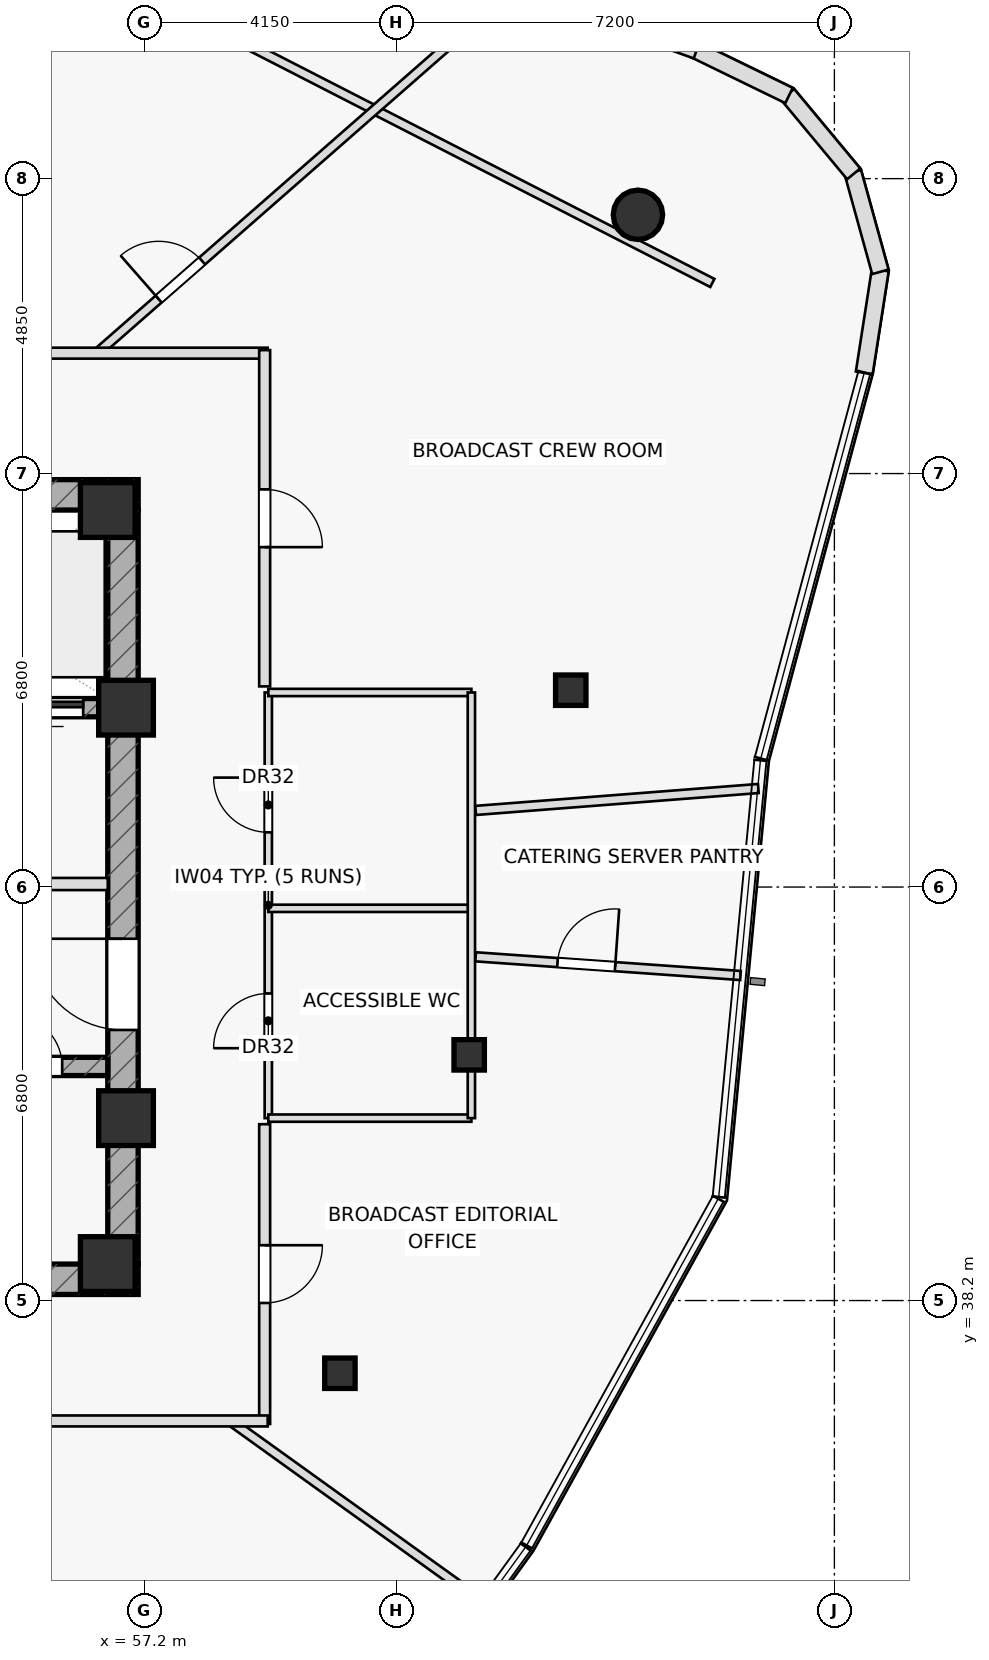
"""IFC4 building model, lengths in metres.
Left out: names, types, materials, properties, quantities, classifications, styles, units other than length and angle.
Written with IfcOpenShell. Run it as: python <this file> out.ifc"""

import sys

from ifc_helpers import new_model, si_unit, direction, frame, frame_2d, origin, origin_2d, place, context, subcontext, project, spatial, rectangle, hollow_rectangle, hollow_circle, extrude, element, fill, save


model = new_model("IFC4")
c1 = context("Model", 3, precision=1e-05, world=origin(), true_north=direction((0.0, 1.0)))
c2 = subcontext(c1, "Body", "Model", "MODEL_VIEW")
j1 = project(units=[si_unit("LENGTHUNIT", "METRE"), si_unit("PLANEANGLEUNIT", "RADIAN")], contexts=[c1])
p1 = place(None, origin())
s1 = spatial("IfcSite", under=j1, at=p1, CompositionType="ELEMENT")
p2 = place(p1, origin())
s2 = spatial("IfcBuilding", under=s1, at=p2, CompositionType="ELEMENT")
p3 = place(p2, frame((0.0, 0.0, 285.5)))
s3 = spatial("IfcBuildingStorey", under=s2, at=p3, CompositionType="ELEMENT", Elevation=285.5)
p4 = place(p3, frame((42.9, 51.45, 0.0), z_axis=(0.0, 0.0, 1.0), x_axis=(1.0, 0.0, 0.0)))
e1 = element("IfcWall", 1, at=p4, inside=s3, PredefinedType="SHEAR", context=c2, shape_type="SweptSolid", body=[
    extrude(rectangle(XDim=14.2, YDim=0.5, at=frame_2d((7.1, 0.0))), origin(), (0.0, 0.0, 1.0), 3.7),
])
p5 = place(p4, frame((0.78, 0.0, 0.0)))
e2 = element("IfcOpeningElement", 2, at=p5, cuts=e1, PredefinedType="OPENING", context=c2, shape_type="SweptSolid", body=[
    extrude(rectangle(XDim=1.05, YDim=2.2, at=frame_2d((0.525, 1.1))), frame((0.0, 0.26, 0.0), z_axis=(0.0, -1.0, 0.0), x_axis=(1.0, 0.0, 0.0)), (0.0, 0.0, 1.0), 0.52),
])
p6 = place(p3, frame((42.9, 38.55, 0.0), z_axis=(0.0, 0.0, 1.0), x_axis=(1.0, 0.0, 0.0)))
e3 = element("IfcWall", 3, at=p6, inside=s3, PredefinedType="SHEAR", context=c2, shape_type="SweptSolid", body=[
    extrude(rectangle(XDim=14.2, YDim=0.5, at=frame_2d((7.1, 0.0))), origin(), (0.0, 0.0, 1.0), 3.7),
])
p7 = place(p6, frame((0.78, 0.0, 0.0)))
e4 = element("IfcOpeningElement", 4, at=p7, cuts=e3, PredefinedType="OPENING", context=c2, shape_type="SweptSolid", body=[
    extrude(rectangle(XDim=1.05, YDim=2.2, at=frame_2d((0.525, 1.1))), frame((0.0, 0.26, 0.0), z_axis=(0.0, -1.0, 0.0), x_axis=(1.0, 0.0, 0.0)), (0.0, 0.0, 1.0), 0.52),
])
p8 = place(p3, frame((56.85, 38.8, 0.0), z_axis=(0.0, 0.0, 1.0), x_axis=(0.0, 1.0, 0.0)))
e5 = element("IfcWall", 5, at=p8, inside=s3, PredefinedType="SHEAR", context=c2, shape_type="SweptSolid", body=[
    extrude(rectangle(XDim=12.4, YDim=0.5, at=frame_2d((6.2, 0.0))), origin(), (0.0, 0.0, 1.0), 3.7),
])
p9 = place(p8, frame((3.85, 0.0, 0.0)))
e6 = element("IfcOpeningElement", 6, at=p9, cuts=e5, PredefinedType="OPENING", context=c2, shape_type="SweptSolid", body=[
    extrude(rectangle(XDim=1.5, YDim=2.2, at=frame_2d((0.75, 1.1))), frame((0.0, 0.26, 0.0), z_axis=(0.0, -1.0, 0.0), x_axis=(1.0, 0.0, 0.0)), (0.0, 0.0, 1.0), 0.52),
])
p10 = place(p3, frame((43.4, 47.95, 0.0), z_axis=(0.0, 0.0, 1.0), x_axis=(1.0, 0.0, 0.0)))
e7 = element("IfcWall", 7, at=p10, inside=s3, PredefinedType="SHEAR", context=c2, shape_type="SweptSolid", body=[
    extrude(rectangle(XDim=13.2, YDim=0.3, at=frame_2d((6.6, 0.0))), origin(), (0.0, 0.0, 1.0), 3.7),
])
p11 = place(p10, frame((8.345, 0.0, 0.0)))
e8 = element("IfcOpeningElement", 8, at=p11, cuts=e7, PredefinedType="OPENING", context=c2, shape_type="SweptSolid", body=[
    extrude(rectangle(XDim=1.15, YDim=2.2, at=frame_2d((0.575, 1.1))), frame((0.0, 0.16, 0.0), z_axis=(0.0, -1.0, 0.0), x_axis=(1.0, 0.0, 0.0)), (0.0, 0.0, 1.0), 0.32),
])
p12 = place(p10, frame((10.065, 0.0, 0.0)))
e9 = element("IfcOpeningElement", 9, at=p12, cuts=e7, PredefinedType="OPENING", context=c2, shape_type="SweptSolid", body=[
    extrude(rectangle(XDim=1.15, YDim=2.2, at=frame_2d((0.575, 1.1))), frame((0.0, 0.16, 0.0), z_axis=(0.0, -1.0, 0.0), x_axis=(1.0, 0.0, 0.0)), (0.0, 0.0, 1.0), 0.32),
])
p13 = place(p10, frame((11.645, 0.0, 0.0)))
e10 = element("IfcOpeningElement", 10, at=p13, cuts=e7, PredefinedType="OPENING", context=c2, shape_type="SweptSolid", body=[
    extrude(rectangle(XDim=1.15, YDim=2.2, at=frame_2d((0.575, 1.1))), frame((0.0, 0.16, 0.0), z_axis=(0.0, -1.0, 0.0), x_axis=(1.0, 0.0, 0.0)), (0.0, 0.0, 1.0), 0.32),
])
p14 = place(p3, frame((43.4, 42.05, 0.0), z_axis=(0.0, 0.0, 1.0), x_axis=(1.0, 0.0, 0.0)))
e11 = element("IfcWall", 11, at=p14, inside=s3, PredefinedType="SHEAR", context=c2, shape_type="SweptSolid", body=[
    extrude(rectangle(XDim=13.2, YDim=0.3, at=frame_2d((6.6, 0.0))), origin(), (0.0, 0.0, 1.0), 3.7),
])
p15 = place(p14, frame((7.45, 0.0, 0.0)))
e12 = element("IfcOpeningElement", 12, at=p15, cuts=e11, PredefinedType="OPENING", context=c2, shape_type="SweptSolid", body=[
    extrude(rectangle(XDim=0.85, YDim=2.05, at=frame_2d((0.425, 1.025))), frame((0.0, 0.16, 0.0), z_axis=(0.0, -1.0, 0.0), x_axis=(1.0, 0.0, 0.0)), (0.0, 0.0, 1.0), 0.32),
])
p16 = place(p14, frame((9.5, 0.0, 0.0)))
e13 = element("IfcOpeningElement", 13, at=p16, cuts=e11, PredefinedType="OPENING", context=c2, shape_type="SweptSolid", body=[
    extrude(rectangle(XDim=0.85, YDim=2.05, at=frame_2d((0.425, 1.025))), frame((0.0, 0.16, 0.0), z_axis=(0.0, -1.0, 0.0), x_axis=(1.0, 0.0, 0.0)), (0.0, 0.0, 1.0), 0.32),
])
p17 = place(p14, frame((11.6, 0.0, 0.0)))
e14 = element("IfcOpeningElement", 14, at=p17, cuts=e11, PredefinedType="OPENING", context=c2, shape_type="SweptSolid", body=[
    extrude(rectangle(XDim=0.85, YDim=2.05, at=frame_2d((0.425, 1.025))), frame((0.0, 0.16, 0.0), z_axis=(0.0, -1.0, 0.0), x_axis=(1.0, 0.0, 0.0)), (0.0, 0.0, 1.0), 0.32),
])
for number, where, z_axis, x_axis in (
    (15, (56.9, 47.95, 0.0), (0.0, 0.0, 1.0), (1.0, 0.0, 0.0)),
    (16, (56.6, 51.2, 0.0), (0.0, 0.0, 1.0), (1.0, 0.0, 0.0)),
    (17, (56.9, 41.2, 0.0), (0.0, 0.0, 1.0), (1.0, 0.0, 0.0)),
    (18, (56.6, 38.8, 0.0), (0.0, 0.0, 1.0), (1.0, 0.0, 0.0)),
):
    element("IfcColumn", number, at=place(p3, frame(where, z_axis=z_axis, x_axis=x_axis)), inside=s3, PredefinedType="COLUMN", context=c2, shape_type="SweptSolid", body=[
        extrude(rectangle(XDim=0.9, YDim=0.9, at=origin_2d()), origin(), (0.0, 0.0, 1.0), 3.7),
    ])
for number, where, z_axis, x_axis in (
    (19, (60.417, 37.004, 0.0), (0.0, 0.0, 1.0), (1.0, 0.0, 0.0)),
    (20, (62.544, 42.24, 0.0), (0.0, 0.0, 1.0), (1.0, 0.0, 0.0)),
    (21, (64.214, 48.237, 0.0), (0.0, 0.0, 1.0), (1.0, 0.0, 0.0)),
):
    element("IfcColumn", number, at=place(p3, frame(where, z_axis=z_axis, x_axis=x_axis)), inside=s3, PredefinedType="COLUMN", context=c2, shape_type="SweptSolid", body=[
        extrude(hollow_rectangle(XDim=0.5, YDim=0.5, WallThickness=0.03, at=origin_2d()), origin(), (0.0, 0.0, 1.0), 3.7),
    ])
p18 = place(p3, frame((65.32, 56.056, 0.0), z_axis=(0.0, 0.0, 1.0), x_axis=(1.0, 0.0, 0.0)))
e22 = element("IfcColumn", 22, at=p18, inside=s3, PredefinedType="COLUMN", context=c2, shape_type="SweptSolid", body=[
    extrude(hollow_circle(Radius=0.406, WallThickness=0.036, at=origin_2d()), origin(), (0.0, 0.0, 1.0), 3.7),
])
p19 = place(p3, frame((50.65, 45.05, 0.0), z_axis=(0.0, 0.0, 1.0), x_axis=(1.0, 0.0, 0.0)))
e23 = element("IfcWall", 23, at=p19, inside=s3, PredefinedType="PARTITIONING", context=c2, shape_type="SweptSolid", body=[
    extrude(rectangle(XDim=5.95, YDim=0.2, at=frame_2d((2.975, 0.0))), origin(), (0.0, 0.0, 1.0), 3.7),
])
p20 = place(p19, frame((1.35, 0.0, 0.0)))
e24 = element("IfcOpeningElement", 24, at=p20, cuts=e23, PredefinedType="OPENING", context=c2, shape_type="SweptSolid", body=[
    extrude(rectangle(XDim=1.5, YDim=2.2, at=frame_2d((0.75, 1.1))), frame((0.0, 0.11, 0.0), z_axis=(0.0, -1.0, 0.0), x_axis=(1.0, 0.0, 0.0)), (0.0, 0.0, 1.0), 0.22),
])
p21 = place(p3, frame((66.543, 54.934, 0.0), z_axis=(0.0, 0.0, 1.0), x_axis=(-0.889966951661, 0.456025026673, 0.0)))
e25 = element("IfcWall", 25, at=p21, inside=s3, PredefinedType="PARTITIONING", context=c2, shape_type="SweptSolid", body=[
    extrude(rectangle(XDim=10.879, YDim=0.15, at=frame_2d((5.439, 0.0))), origin(), (0.0, 0.0, 1.0), 3.235),
])
p22 = place(p3, frame((59.24, 41.2, 0.0), z_axis=(0.0, 0.0, 1.0), x_axis=(0.0, 1.0, 0.0)))
e26 = element("IfcWall", 26, at=p22, inside=s3, PredefinedType="PARTITIONING", context=c2, shape_type="SweptSolid", body=[
    extrude(rectangle(XDim=7.0, YDim=0.12, at=frame_2d((3.5, 0.0))), origin(), (0.0, 0.0, 1.0), 3.7),
])
p23 = place(p22, frame((1.15, 0.0, 0.0)))
e27 = element("IfcOpeningElement", 27, at=p23, cuts=e26, PredefinedType="OPENING", context=c2, shape_type="SweptSolid", body=[
    extrude(rectangle(XDim=0.9, YDim=2.05, at=frame_2d((0.45, 1.025))), frame((0.0, 0.07, 0.0), z_axis=(0.0, -1.0, 0.0), x_axis=(1.0, 0.0, 0.0)), (0.0, 0.0, 1.0), 0.14),
])
p24 = place(p22, frame((4.7, 0.0, 0.0)))
e28 = element("IfcOpeningElement", 28, at=p24, cuts=e26, PredefinedType="OPENING", context=c2, shape_type="SweptSolid", body=[
    extrude(rectangle(XDim=0.9, YDim=2.05, at=frame_2d((0.45, 1.025))), frame((0.0, 0.07, 0.0), z_axis=(0.0, -1.0, 0.0), x_axis=(1.0, 0.0, 0.0)), (0.0, 0.0, 1.0), 0.14),
])
p25 = place(p3, frame((59.24, 41.2, 0.0), z_axis=(0.0, 0.0, 1.0), x_axis=(1.0, 0.0, 0.0)))
e29 = element("IfcWall", 29, at=p25, inside=s3, PredefinedType="PARTITIONING", context=c2, shape_type="SweptSolid", body=[
    extrude(rectangle(XDim=3.34, YDim=0.12, at=frame_2d((1.67, 0.0))), origin(), (0.0, 0.0, 1.0), 3.175),
])
for number, where, z_axis, x_axis in (
    (30, (59.24, 44.65, 0.0), (0.0, 0.0, 1.0), (1.0, 0.0, 0.0)),
    (31, (59.24, 48.2, 0.0), (0.0, 0.0, 1.0), (1.0, 0.0, 0.0)),
):
    element("IfcWall", number, at=place(p3, frame(where, z_axis=z_axis, x_axis=x_axis)), inside=s3, PredefinedType="PARTITIONING", context=c2, shape_type="SweptSolid", body=[
        extrude(rectangle(XDim=3.34, YDim=0.12, at=frame_2d((1.67, 0.0))), origin(), (0.0, 0.0, 1.0), 3.7),
    ])
p26 = place(p3, frame((62.58, 41.2, 0.0), z_axis=(0.0, 0.0, 1.0), x_axis=(0.0, 1.0, 0.0)))
e32 = element("IfcWall", 32, at=p26, inside=s3, PredefinedType="PARTITIONING", context=c2, shape_type="SweptSolid", body=[
    extrude(rectangle(XDim=7.0, YDim=0.12, at=frame_2d((3.5, 0.0))), origin(), (0.0, 0.0, 1.0), 3.235),
])
p27 = place(p3, frame((58.615, 36.22, 0.0), z_axis=(0.0, 0.0, 1.0), x_axis=(0.812006963526, -0.583647745806, 0.0)))
e33 = element("IfcWall", 33, at=p27, inside=s3, PredefinedType="PARTITIONING", context=c2, shape_type="SweptSolid", body=[
    extrude(rectangle(XDim=5.161, YDim=0.15, at=frame_2d((2.58, 0.0))), origin(), (0.0, 0.0, 1.0), 3.235),
])
p28 = place(p3, frame((62.65, 43.853, 0.0), z_axis=(0.0, 0.0, 1.0), x_axis=(0.997519631331, -0.070388813801, 0.0)))
e34 = element("IfcWall", 34, at=p28, inside=s3, PredefinedType="PARTITIONING", context=c2, shape_type="SweptSolid", body=[
    extrude(rectangle(XDim=4.367, YDim=0.15, at=frame_2d((2.183, 0.0))), origin(), (0.0, 0.0, 1.0), 3.235),
])
p29 = place(p28, frame((1.35, 0.0, 0.0)))
e35 = element("IfcOpeningElement", 35, at=p29, cuts=e34, PredefinedType="OPENING", context=c2, shape_type="SweptSolid", body=[
    extrude(rectangle(XDim=0.95, YDim=2.05, at=frame_2d((0.475, 1.025))), frame((0.0, 0.085, 0.0), z_axis=(0.0, -1.0, 0.0), x_axis=(1.0, 0.0, 0.0)), (0.0, 0.0, 1.0), 0.17),
])
p30 = place(p3, frame((62.65, 46.26, 0.0), z_axis=(0.0, 0.0, 1.0), x_axis=(0.997005938074, 0.077325024708, 0.0)))
e36 = element("IfcWall", 36, at=p30, inside=s3, PredefinedType="PARTITIONING", context=c2, shape_type="SweptSolid", body=[
    extrude(rectangle(XDim=4.663, YDim=0.15, at=frame_2d((2.332, 0.0))), origin(), (0.0, 0.0, 1.0), 3.235),
])
p31 = place(p3, frame((56.422, 53.78, 0.0), z_axis=(0.0, 0.0, 1.0), x_axis=(0.752182981844, 0.658954294184, 0.0)))
e37 = element("IfcWall", 37, at=p31, inside=s3, PredefinedType="PARTITIONING", context=c2, shape_type="SweptSolid", body=[
    extrude(rectangle(XDim=9.184, YDim=0.15, at=frame_2d((4.592, 0.0))), origin(), (0.0, 0.0, 1.0), 3.175),
])
p32 = place(p31, frame((1.35, 0.0, 0.0)))
e38 = element("IfcOpeningElement", 38, at=p32, cuts=e37, PredefinedType="OPENING", context=c2, shape_type="SweptSolid", body=[
    extrude(rectangle(XDim=0.95, YDim=2.05, at=frame_2d((0.475, 1.025))), frame((0.0, 0.085, 0.0), z_axis=(0.0, -1.0, 0.0), x_axis=(1.0, 0.0, 0.0)), (0.0, 0.0, 1.0), 0.17),
])
p33 = place(p3, frame((54.3, 53.78, 0.0), z_axis=(0.0, 0.0, 1.0), x_axis=(1.0, 0.0, 0.0)))
e39 = element("IfcWall", 39, at=p33, inside=s3, PredefinedType="PARTITIONING", context=c2, shape_type="SweptSolid", body=[
    extrude(rectangle(XDim=4.93, YDim=0.18, at=frame_2d((2.465, 0.0))), origin(), (0.0, 0.0, 1.0), 3.7),
])
p34 = place(p3, frame((59.18, 53.83, 0.0), z_axis=(0.0, 0.0, 1.0), x_axis=(0.0, -1.0, 0.0)))
e40 = element("IfcWall", 40, at=p34, inside=s3, PredefinedType="PARTITIONING", context=c2, shape_type="SweptSolid", body=[
    extrude(rectangle(XDim=5.53, YDim=0.18, at=frame_2d((2.765, 0.0))), origin(), (0.0, 0.0, 1.0), 3.7),
])
p35 = place(p34, frame((2.29, 0.0, 0.0)))
e41 = element("IfcOpeningElement", 41, at=p35, cuts=e40, PredefinedType="OPENING", context=c2, shape_type="SweptSolid", body=[
    extrude(rectangle(XDim=0.95, YDim=2.05, at=frame_2d((0.475, 1.025))), frame((0.0, 0.1, 0.0), z_axis=(0.0, -1.0, 0.0), x_axis=(1.0, 0.0, 0.0)), (0.0, 0.0, 1.0), 0.2),
])
p36 = place(p3, frame((59.18, 41.1, 0.0), z_axis=(0.0, 0.0, 1.0), x_axis=(0.0, -1.0, 0.0)))
e42 = element("IfcWall", 42, at=p36, inside=s3, PredefinedType="PARTITIONING", context=c2, shape_type="SweptSolid", body=[
    extrude(rectangle(XDim=4.93, YDim=0.18, at=frame_2d((2.465, 0.0))), origin(), (0.0, 0.0, 1.0), 3.435),
])
p37 = place(p36, frame((1.99, 0.0, 0.0)))
e43 = element("IfcOpeningElement", 43, at=p37, cuts=e42, PredefinedType="OPENING", context=c2, shape_type="SweptSolid", body=[
    extrude(rectangle(XDim=0.95, YDim=2.05, at=frame_2d((0.475, 1.025))), frame((0.0, 0.1, 0.0), z_axis=(0.0, -1.0, 0.0), x_axis=(1.0, 0.0, 0.0)), (0.0, 0.0, 1.0), 0.2),
])
p38 = place(p3, frame((59.23, 36.22, 0.0), z_axis=(0.0, 0.0, 1.0), x_axis=(-1.0, 0.0, 0.0)))
e44 = element("IfcWall", 44, at=p38, inside=s3, PredefinedType="PARTITIONING", context=c2, shape_type="SweptSolid", body=[
    extrude(rectangle(XDim=19.48, YDim=0.18, at=frame_2d((9.74, 0.0))), origin(), (0.0, 0.0, 1.0), 3.175),
])
p39 = place(p38, frame((3.955, 0.0, 0.0)))
e45 = element("IfcOpeningElement", 45, at=p39, cuts=e44, PredefinedType="OPENING", context=c2, shape_type="SweptSolid", body=[
    extrude(rectangle(XDim=0.95, YDim=2.05, at=frame_2d((0.475, 1.025))), frame((0.0, 0.1, 0.0), z_axis=(0.0, -1.0, 0.0), x_axis=(1.0, 0.0, 0.0)), (0.0, 0.0, 1.0), 0.2),
])
p40 = place(p38, frame((9.21, 0.0, 0.0)))
e46 = element("IfcOpeningElement", 46, at=p40, cuts=e44, PredefinedType="OPENING", context=c2, shape_type="SweptSolid", body=[
    extrude(rectangle(XDim=0.95, YDim=2.05, at=frame_2d((0.475, 1.025))), frame((0.0, 0.1, 0.0), z_axis=(0.0, -1.0, 0.0), x_axis=(1.0, 0.0, 0.0)), (0.0, 0.0, 1.0), 0.2),
])
p41 = place(p38, frame((13.622, 0.0, 0.0)))
e47 = element("IfcOpeningElement", 47, at=p41, cuts=e44, PredefinedType="OPENING", context=c2, shape_type="SweptSolid", body=[
    extrude(rectangle(XDim=0.95, YDim=2.05, at=frame_2d((0.475, 1.025))), frame((0.0, 0.1, 0.0), z_axis=(0.0, -1.0, 0.0), x_axis=(1.0, 0.0, 0.0)), (0.0, 0.0, 1.0), 0.2),
])
p42 = place(p3, frame((69.042, 53.457, 0.0), z_axis=(0.0, 0.0, 1.0), x_axis=(0.153858745584, 0.98809285313, 0.0)))
e48 = element("IfcWall", 48, at=p42, inside=s3, PredefinedType="STANDARD", context=c2, shape_type="SweptSolid", body=[
    extrude(rectangle(XDim=1.71, YDim=0.28, at=frame_2d((0.855, 0.0))), origin(), (0.0, 0.0, 1.0), 3.7),
])
p43 = place(p3, frame((69.306, 55.118, 0.0), z_axis=(0.0, 0.0, 1.0), x_axis=(-0.266301999357, 0.963889643651, 0.0)))
e49 = element("IfcWall", 49, at=p43, inside=s3, PredefinedType="STANDARD", context=c2, shape_type="SweptSolid", body=[
    extrude(rectangle(XDim=1.699, YDim=0.28, at=frame_2d((0.849, 0.0))), origin(), (0.0, 0.0, 1.0), 3.7),
])
p44 = place(p3, frame((68.867, 56.729, 0.0), z_axis=(0.0, 0.0, 1.0), x_axis=(-0.639477393752, 0.768809900353, 0.0)))
e50 = element("IfcWall", 50, at=p44, inside=s3, PredefinedType="STANDARD", context=c2, shape_type="SweptSolid", body=[
    extrude(rectangle(XDim=1.699, YDim=0.28, at=frame_2d((0.85, 0.0))), origin(), (0.0, 0.0, 1.0), 3.7),
])
p45 = place(p3, frame((67.804, 58.017, 0.0), z_axis=(0.0, 0.0, 1.0), x_axis=(-0.899168742042, 0.437602071904, 0.0)))
e51 = element("IfcWall", 51, at=p45, inside=s3, PredefinedType="STANDARD", context=c2, shape_type="SweptSolid", body=[
    extrude(rectangle(XDim=1.722, YDim=0.28, at=frame_2d((0.861, 0.0))), origin(), (0.0, 0.0, 1.0), 3.7),
])
p46 = place(p3, frame((66.284, 58.759, 0.0), z_axis=(0.0, 0.0, 1.0), x_axis=(-0.94102093615, 0.338348337852, 0.0)))
e52 = element("IfcWall", 52, at=p46, inside=s3, PredefinedType="STANDARD", context=c2, shape_type="SweptSolid", body=[
    extrude(rectangle(XDim=6.616, YDim=0.28, at=frame_2d((3.308, 0.0))), origin(), (0.0, 0.0, 1.0), 3.7),
])
p47 = place(p9, origin())
e53 = element("IfcDoor", 53, at=p47, inside=s3, OperationType="SINGLE_SWING_RIGHT", PredefinedType="DOOR", context=c2, shape_type="SweptSolid", body=[
    extrude(rectangle(XDim=1.5, YDim=2.2, at=frame_2d((0.75, 1.1))), frame((0.0, 0.025, 0.0), z_axis=(0.0, -1.0, 0.0), x_axis=(1.0, 0.0, 0.0)), (0.0, 0.0, 1.0), 0.05),
])
fill(e6, e53)
p48 = place(p17, origin())
e54 = element("IfcDoor", 54, at=p48, inside=s3, OperationType="SINGLE_SWING_LEFT", PredefinedType="DOOR", context=c2, shape_type="SweptSolid", body=[
    extrude(rectangle(XDim=0.85, YDim=2.05, at=frame_2d((0.425, 1.025))), frame((0.0, 0.025, 0.0), z_axis=(0.0, -1.0, 0.0), x_axis=(1.0, 0.0, 0.0)), (0.0, 0.0, 1.0), 0.05),
])
fill(e14, e54)
p49 = place(p23, origin())
e55 = element("IfcDoor", 55, at=p49, inside=s3, OperationType="SINGLE_SWING_LEFT", PredefinedType="DOOR", context=c2, shape_type="SweptSolid", body=[
    extrude(rectangle(XDim=0.9, YDim=2.05, at=frame_2d((0.45, 1.025))), frame((0.0, 0.025, 0.0), z_axis=(0.0, -1.0, 0.0), x_axis=(1.0, 0.0, 0.0)), (0.0, 0.0, 1.0), 0.05),
])
fill(e27, e55)
p50 = place(p24, origin())
e56 = element("IfcDoor", 56, at=p50, inside=s3, OperationType="SINGLE_SWING_RIGHT", PredefinedType="DOOR", context=c2, shape_type="SweptSolid", body=[
    extrude(rectangle(XDim=0.9, YDim=2.05, at=frame_2d((0.45, 1.025))), frame((0.0, 0.025, 0.0), z_axis=(0.0, -1.0, 0.0), x_axis=(1.0, 0.0, 0.0)), (0.0, 0.0, 1.0), 0.05),
])
fill(e28, e56)
p51 = place(p29, origin())
e57 = element("IfcDoor", 57, at=p51, inside=s3, OperationType="SINGLE_SWING_RIGHT", PredefinedType="DOOR", context=c2, shape_type="SweptSolid", body=[
    extrude(rectangle(XDim=0.95, YDim=2.05, at=frame_2d((0.475, 1.025))), frame((0.0, 0.025, 0.0), z_axis=(0.0, -1.0, 0.0), x_axis=(1.0, 0.0, 0.0)), (0.0, 0.0, 1.0), 0.05),
])
fill(e35, e57)
p52 = place(p32, origin())
e58 = element("IfcDoor", 58, at=p52, inside=s3, OperationType="SINGLE_SWING_LEFT", PredefinedType="DOOR", context=c2, shape_type="SweptSolid", body=[
    extrude(rectangle(XDim=0.95, YDim=2.05, at=frame_2d((0.475, 1.025))), frame((0.0, 0.025, 0.0), z_axis=(0.0, -1.0, 0.0), x_axis=(1.0, 0.0, 0.0)), (0.0, 0.0, 1.0), 0.05),
])
fill(e38, e58)
p53 = place(p35, origin())
e59 = element("IfcDoor", 59, at=p53, inside=s3, OperationType="SINGLE_SWING_RIGHT", PredefinedType="DOOR", context=c2, shape_type="SweptSolid", body=[
    extrude(rectangle(XDim=0.95, YDim=2.05, at=frame_2d((0.475, 1.025))), frame((0.0, 0.025, 0.0), z_axis=(0.0, -1.0, 0.0), x_axis=(1.0, 0.0, 0.0)), (0.0, 0.0, 1.0), 0.05),
])
fill(e41, e59)
p54 = place(p37, origin())
e60 = element("IfcDoor", 60, at=p54, inside=s3, OperationType="SINGLE_SWING_LEFT", PredefinedType="DOOR", context=c2, shape_type="SweptSolid", body=[
    extrude(rectangle(XDim=0.95, YDim=2.05, at=frame_2d((0.475, 1.025))), frame((0.0, 0.025, 0.0), z_axis=(0.0, -1.0, 0.0), x_axis=(1.0, 0.0, 0.0)), (0.0, 0.0, 1.0), 0.05),
])
fill(e43, e60)
p55 = place(p13, origin())
e61 = element("IfcDoor", 61, at=p55, inside=s3, OperationType="SLIDING_TO_LEFT", PredefinedType="DOOR", context=c2, shape_type="SweptSolid", body=[
    extrude(rectangle(XDim=1.15, YDim=2.2, at=frame_2d((0.575, 1.1))), frame((0.0, 0.025, 0.0), z_axis=(0.0, -1.0, 0.0), x_axis=(1.0, 0.0, 0.0)), (0.0, 0.0, 1.0), 0.05),
])
fill(e10, e61)
save(model, sys.argv[1])
